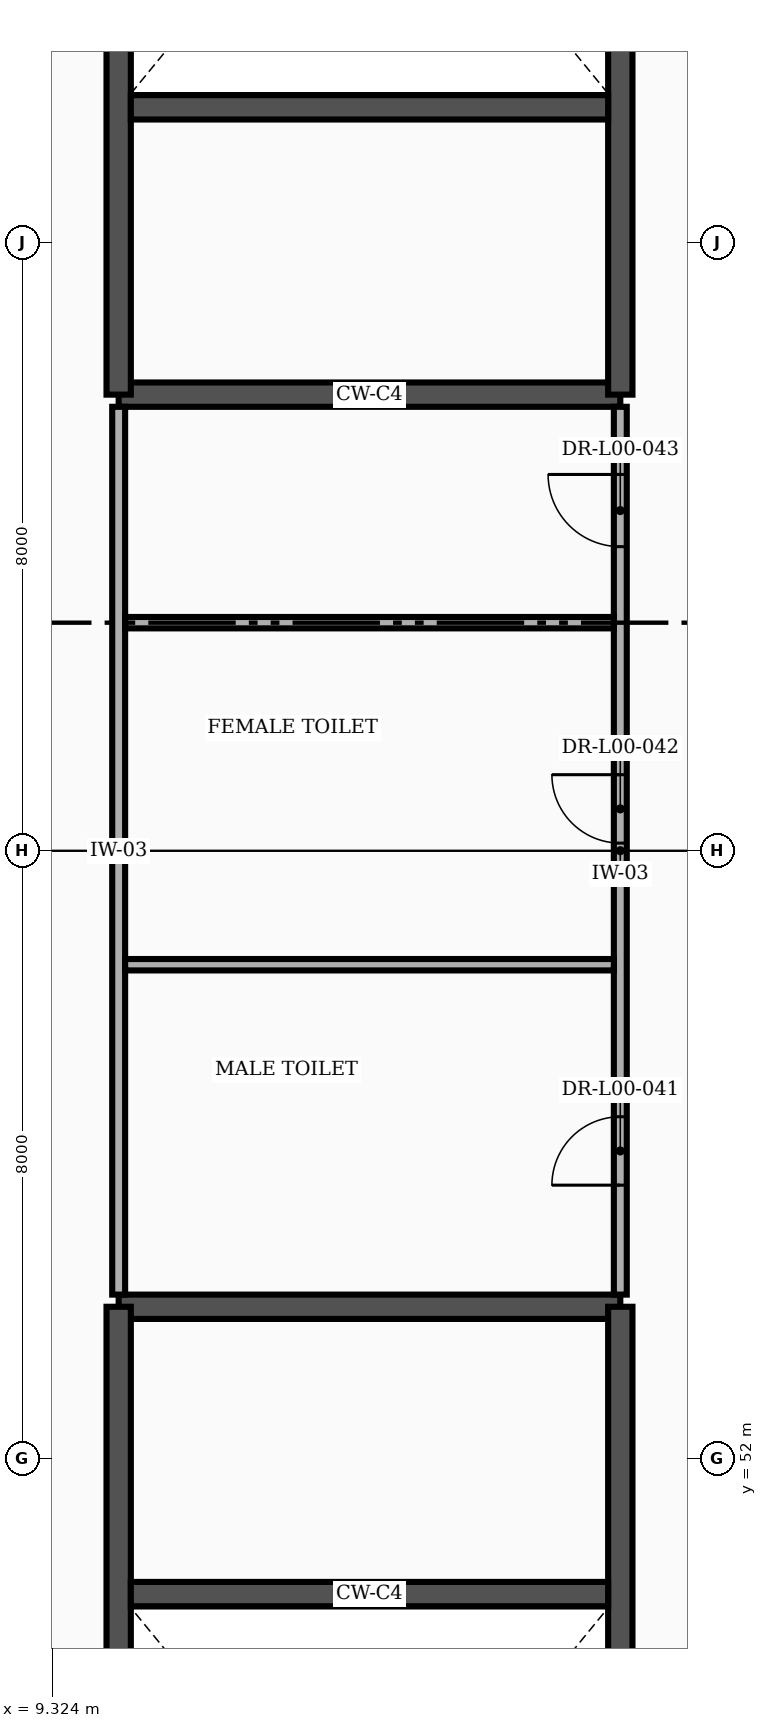
"""IFC4 building model, lengths in metres.
Left out: names, types, materials, properties, quantities, classifications, styles, units other than length and angle.
Written with IfcOpenShell. Run it as: python <this file> out.ifc"""

import sys

from ifc_helpers import new_model, si_unit, direction, frame, frame_2d, origin, place, context, subcontext, project, spatial, rectangle, extrude, element, fill, save


model = new_model("IFC4")
c1 = context("Model", 3, precision=1e-05, world=origin(), true_north=direction((0.0, 1.0)))
c2 = subcontext(c1, "Body", "Model", "MODEL_VIEW")
j1 = project(units=[si_unit("LENGTHUNIT", "METRE"), si_unit("PLANEANGLEUNIT", "RADIAN")], contexts=[c1])
p1 = place(None, origin())
s1 = spatial("IfcSite", under=j1, at=p1, CompositionType="ELEMENT")
p2 = place(p1, origin())
s2 = spatial("IfcBuilding", under=s1, at=p2, CompositionType="ELEMENT")
p3 = place(p2, origin())
s3 = spatial("IfcBuildingStorey", under=s2, at=p3, CompositionType="ELEMENT", Elevation=0.0)
p4 = place(p3, frame((10.2, 54.0, 0.0), z_axis=(0.0, 0.0, 1.0), x_axis=(1.0, 0.0, 0.0)))
e1 = element("IfcWall", 1, at=p4, inside=s3, PredefinedType="SHEAR", context=c2, shape_type="SweptSolid", body=[
    extrude(rectangle(XDim=6.6, YDim=0.32, at=frame_2d((3.3, 0.0))), origin(), (0.0, 0.0, 1.0), 5.75),
])
p5 = place(p3, frame((10.2, 39.4, 0.0), z_axis=(0.0, 0.0, 1.0), x_axis=(0.0, 1.0, 0.0)))
e2 = element("IfcWall", 2, at=p5, inside=s3, PredefinedType="SHEAR", context=c2, shape_type="SweptSolid", body=[
    extrude(rectangle(XDim=14.6, YDim=0.32, at=frame_2d((7.3, 0.0))), origin(), (0.0, 0.0, 1.0), 5.75),
])
p6 = place(p5, frame((0.55, 0.0, 0.0)))
e3 = element("IfcOpeningElement", 3, at=p6, cuts=e2, PredefinedType="OPENING", context=c2, shape_type="SweptSolid", body=[
    extrude(rectangle(XDim=3.0, YDim=2.25, at=frame_2d((1.5, 1.125))), frame((0.0, 0.172, 0.0), z_axis=(0.0, -1.0, 0.0), x_axis=(1.0, 0.0, 0.0)), (0.0, 0.0, 1.0), 0.344),
])
p7 = place(p3, frame((16.8, 39.4, 0.0), z_axis=(0.0, 0.0, 1.0), x_axis=(0.0, 1.0, 0.0)))
e4 = element("IfcWall", 4, at=p7, inside=s3, PredefinedType="SHEAR", context=c2, shape_type="SweptSolid", body=[
    extrude(rectangle(XDim=14.6, YDim=0.32, at=frame_2d((7.3, 0.0))), origin(), (0.0, 0.0, 1.0), 5.75),
])
p8 = place(p3, frame((10.36, 50.22, 0.0), z_axis=(0.0, 0.0, 1.0), x_axis=(1.0, 0.0, 0.0)))
e5 = element("IfcWall", 5, at=p8, inside=s3, PredefinedType="SHEAR", context=c2, shape_type="SweptSolid", body=[
    extrude(rectangle(XDim=6.28, YDim=0.32, at=frame_2d((3.14, 0.0))), origin(), (0.0, 0.0, 1.0), 5.75),
])
p9 = place(p3, frame((10.2, 66.0, 0.0), z_axis=(0.0, 0.0, 1.0), x_axis=(1.0, 0.0, 0.0)))
e6 = element("IfcWall", 6, at=p9, inside=s3, PredefinedType="SHEAR", context=c2, shape_type="SweptSolid", body=[
    extrude(rectangle(XDim=6.6, YDim=0.32, at=frame_2d((3.3, 0.0))), origin(), (0.0, 0.0, 1.0), 5.75),
])
p10 = place(p3, frame((10.2, 66.0, 0.0), z_axis=(0.0, 0.0, 1.0), x_axis=(0.0, 1.0, 0.0)))
e7 = element("IfcWall", 7, at=p10, inside=s3, PredefinedType="SHEAR", context=c2, shape_type="SweptSolid", body=[
    extrude(rectangle(XDim=14.6, YDim=0.32, at=frame_2d((7.3, 0.0))), origin(), (0.0, 0.0, 1.0), 5.75),
])
p11 = place(p10, frame((11.05, 0.0, 0.0)))
e8 = element("IfcOpeningElement", 8, at=p11, cuts=e7, PredefinedType="OPENING", context=c2, shape_type="SweptSolid", body=[
    extrude(rectangle(XDim=3.0, YDim=2.25, at=frame_2d((1.5, 1.125))), frame((0.0, 0.172, 0.0), z_axis=(0.0, -1.0, 0.0), x_axis=(1.0, 0.0, 0.0)), (0.0, 0.0, 1.0), 0.344),
])
p12 = place(p3, frame((16.8, 66.0, 0.0), z_axis=(0.0, 0.0, 1.0), x_axis=(0.0, 1.0, 0.0)))
e9 = element("IfcWall", 9, at=p12, inside=s3, PredefinedType="SHEAR", context=c2, shape_type="SweptSolid", body=[
    extrude(rectangle(XDim=14.6, YDim=0.32, at=frame_2d((7.3, 0.0))), origin(), (0.0, 0.0, 1.0), 5.75),
])
p13 = place(p3, frame((10.36, 69.78, 0.0), z_axis=(0.0, 0.0, 1.0), x_axis=(1.0, 0.0, 0.0)))
e10 = element("IfcWall", 10, at=p13, inside=s3, PredefinedType="SHEAR", context=c2, shape_type="SweptSolid", body=[
    extrude(rectangle(XDim=6.28, YDim=0.32, at=frame_2d((3.14, 0.0))), origin(), (0.0, 0.0, 1.0), 5.75),
])
p14 = place(p3, frame((10.2, 54.16, 0.0), z_axis=(0.0, 0.0, 1.0), x_axis=(0.0, 1.0, 0.0)))
e11 = element("IfcWall", 11, at=p14, inside=s3, PredefinedType="PARTITIONING", context=c2, shape_type="SweptSolid", body=[
    extrude(rectangle(XDim=11.68, YDim=0.17, at=frame_2d((5.84, 0.0))), origin(), (0.0, 0.0, 1.0), 5.75),
])
p15 = place(p3, frame((16.8, 54.16, 0.0), z_axis=(0.0, 0.0, 1.0), x_axis=(0.0, 1.0, 0.0)))
e12 = element("IfcWall", 12, at=p15, inside=s3, PredefinedType="PARTITIONING", context=c2, shape_type="SweptSolid", body=[
    extrude(rectangle(XDim=11.68, YDim=0.17, at=frame_2d((5.84, 0.0))), origin(), (0.0, 0.0, 1.0), 5.75),
])
p16 = place(p15, frame((1.44, 0.0, 0.0)))
e13 = element("IfcOpeningElement", 13, at=p16, cuts=e12, PredefinedType="OPENING", context=c2, shape_type="SweptSolid", body=[
    extrude(rectangle(XDim=0.9, YDim=2.1, at=frame_2d((0.45, 1.05))), frame((0.0, 0.097, 0.0), z_axis=(0.0, -1.0, 0.0), x_axis=(1.0, 0.0, 0.0)), (0.0, 0.0, 1.0), 0.194),
])
p17 = place(p15, frame((5.94, 0.0, 0.0)))
e14 = element("IfcOpeningElement", 14, at=p17, cuts=e12, PredefinedType="OPENING", context=c2, shape_type="SweptSolid", body=[
    extrude(rectangle(XDim=0.9, YDim=2.1, at=frame_2d((0.45, 1.05))), frame((0.0, 0.097, 0.0), z_axis=(0.0, -1.0, 0.0), x_axis=(1.0, 0.0, 0.0)), (0.0, 0.0, 1.0), 0.194),
])
p18 = place(p15, frame((9.84, 0.0, 0.0)))
e15 = element("IfcOpeningElement", 15, at=p18, cuts=e12, PredefinedType="OPENING", context=c2, shape_type="SweptSolid", body=[
    extrude(rectangle(XDim=0.95, YDim=2.1, at=frame_2d((0.475, 1.05))), frame((0.0, 0.097, 0.0), z_axis=(0.0, -1.0, 0.0), x_axis=(1.0, 0.0, 0.0)), (0.0, 0.0, 1.0), 0.194),
])
for number, where, z_axis, x_axis in (
    (16, (10.285, 58.5, 0.0), (0.0, 0.0, 1.0), (1.0, 0.0, 0.0)),
    (17, (10.285, 63.0, 0.0), (0.0, 0.0, 1.0), (1.0, 0.0, 0.0)),
):
    element("IfcWall", number, at=place(p3, frame(where, z_axis=z_axis, x_axis=x_axis)), inside=s3, PredefinedType="PARTITIONING", context=c2, shape_type="SweptSolid", body=[
        extrude(rectangle(XDim=6.43, YDim=0.15, at=frame_2d((3.215, 0.0))), origin(), (0.0, 0.0, 1.0), 5.75),
    ])
p19 = place(p16, origin())
e18 = element("IfcDoor", 18, at=p19, inside=s3, OperationType="SINGLE_SWING_LEFT", PredefinedType="DOOR", context=c2, shape_type="SweptSolid", body=[
    extrude(rectangle(XDim=0.9, YDim=2.1, at=frame_2d((0.45, 1.05))), frame((0.0, 0.025, 0.0), z_axis=(0.0, -1.0, 0.0), x_axis=(1.0, 0.0, 0.0)), (0.0, 0.0, 1.0), 0.05),
])
fill(e13, e18)
p20 = place(p17, origin())
e19 = element("IfcDoor", 19, at=p20, inside=s3, OperationType="SINGLE_SWING_RIGHT", PredefinedType="DOOR", context=c2, shape_type="SweptSolid", body=[
    extrude(rectangle(XDim=0.9, YDim=2.1, at=frame_2d((0.45, 1.05))), frame((0.0, 0.025, 0.0), z_axis=(0.0, -1.0, 0.0), x_axis=(1.0, 0.0, 0.0)), (0.0, 0.0, 1.0), 0.05),
])
fill(e14, e19)
p21 = place(p18, origin())
e20 = element("IfcDoor", 20, at=p21, inside=s3, OperationType="SINGLE_SWING_RIGHT", PredefinedType="DOOR", context=c2, shape_type="SweptSolid", body=[
    extrude(rectangle(XDim=0.95, YDim=2.1, at=frame_2d((0.475, 1.05))), frame((0.0, 0.025, 0.0), z_axis=(0.0, -1.0, 0.0), x_axis=(1.0, 0.0, 0.0)), (0.0, 0.0, 1.0), 0.05),
])
fill(e15, e20)
save(model, sys.argv[1])
